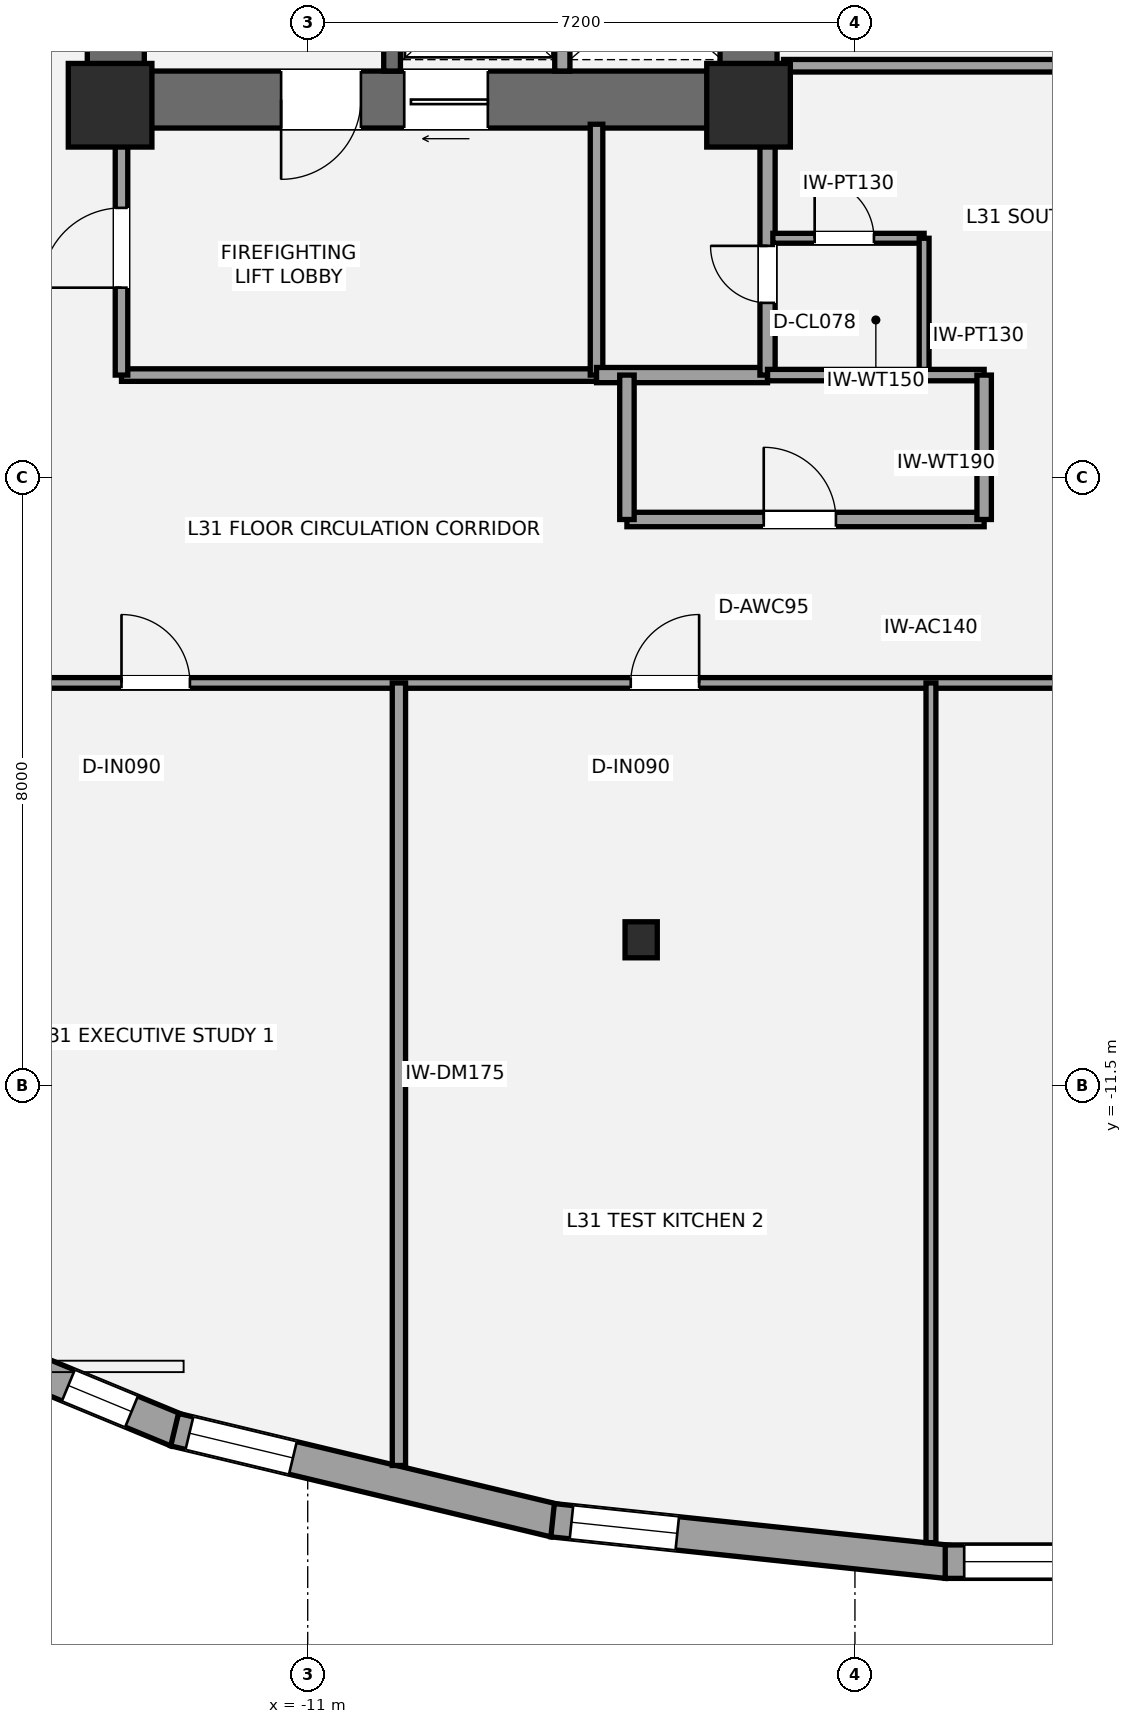
"""IFC4 building model, lengths in metres.
Left out: names, types, materials, properties, quantities, classifications, styles, units other than length and angle.
Written with IfcOpenShell. Run it as: python <this file> out.ifc"""

import sys

from ifc_helpers import new_model, si_unit, direction, frame, frame_2d, origin, origin_2d, place, context, subcontext, project, spatial, rectangle, i_section, extrude, element, fill, save


model = new_model("IFC4")
c1 = context("Model", 3, precision=1e-05, world=origin(), true_north=direction((0.0, 1.0)))
c2 = subcontext(c1, "Body", "Model", "MODEL_VIEW")
j1 = project(units=[si_unit("LENGTHUNIT", "METRE"), si_unit("PLANEANGLEUNIT", "RADIAN")], contexts=[c1])
p1 = place(None, origin())
s1 = spatial("IfcSite", under=j1, at=p1, CompositionType="ELEMENT")
p2 = place(p1, origin())
s2 = spatial("IfcBuilding", under=s1, at=p2, CompositionType="ELEMENT")
p3 = place(p2, frame((0.0, 0.0, 117.6)))
s3 = spatial("IfcBuildingStorey", under=s2, at=p3, CompositionType="ELEMENT", Elevation=117.6)
p4 = place(p3, frame((-13.525, 1.1, 0.0), z_axis=(0.0, 0.0, 1.0), x_axis=(0.0, 1.0, 0.0)))
e1 = element("IfcWall", 1, at=p4, inside=s3, PredefinedType="SHEAR", context=c2, shape_type="SweptSolid", body=[
    extrude(rectangle(XDim=8.65, YDim=0.75, at=frame_2d((4.325, 0.0))), origin(), (0.0, 0.0, 1.0), 3.5),
])
p5 = place(p3, frame((-4.825, 1.475, 0.0), z_axis=(0.0, 0.0, 1.0), x_axis=(-1.0, 0.0, 0.0)))
e2 = element("IfcWall", 2, at=p5, inside=s3, PredefinedType="SHEAR", context=c2, shape_type="SweptSolid", body=[
    extrude(rectangle(XDim=9.075, YDim=0.75, at=frame_2d((4.538, 0.0))), origin(), (0.0, 0.0, 1.0), 3.5),
])
p6 = place(p5, frame((5.475, 0.0, 0.0)))
e3 = element("IfcOpeningElement", 3, at=p6, cuts=e2, PredefinedType="OPENING", context=c2, shape_type="SweptSolid", body=[
    extrude(rectangle(XDim=1.05, YDim=2.15, at=frame_2d((0.525, 1.075))), frame((0.0, 0.385, 0.0), z_axis=(0.0, -1.0, 0.0), x_axis=(1.0, 0.0, 0.0)), (0.0, 0.0, 1.0), 0.77),
])
p7 = place(p5, frame((3.805, 0.0, 0.0)))
e4 = element("IfcOpeningElement", 4, at=p7, cuts=e2, PredefinedType="OPENING", context=c2, shape_type="SweptSolid", body=[
    extrude(rectangle(XDim=1.1, YDim=2.2, at=frame_2d((0.55, 1.1))), frame((0.0, 0.385, 0.0), z_axis=(0.0, -1.0, 0.0), x_axis=(1.0, 0.0, 0.0)), (0.0, 0.0, 1.0), 0.77),
])
p8 = place(p3, frame((-5.2, 1.1, 0.0), z_axis=(0.0, 0.0, 1.0), x_axis=(0.0, 1.0, 0.0)))
e5 = element("IfcWall", 5, at=p8, inside=s3, PredefinedType="SHEAR", context=c2, shape_type="SweptSolid", body=[
    extrude(rectangle(XDim=2.7, YDim=0.75, at=frame_2d((1.35, 0.0))), origin(), (0.0, 0.0, 1.0), 3.5),
])
p9 = place(p3, frame((-9.89, 1.85, 0.0), z_axis=(0.0, 0.0, 1.0), x_axis=(0.0, 1.0, 0.0)))
e6 = element("IfcWall", 6, at=p9, inside=s3, PredefinedType="SHEAR", context=c2, shape_type="SweptSolid", body=[
    extrude(rectangle(XDim=7.15, YDim=0.22, at=frame_2d((3.575, 0.0))), origin(), (0.0, 0.0, 1.0), 3.5),
])
for number, where, z_axis, x_axis in (
    (7, (-13.6, 1.4, 0.0), (0.0, 0.0, 1.0), (1.0, 0.0, 0.0)),
    (8, (-5.2, 1.4, 0.0), (0.0, 0.0, 1.0), (1.0, 0.0, 0.0)),
):
    element("IfcColumn", number, at=place(p3, frame(where, z_axis=z_axis, x_axis=x_axis)), inside=s3, PredefinedType="COLUMN", context=c2, shape_type="SweptSolid", body=[
        extrude(rectangle(XDim=1.1, YDim=1.1, at=origin_2d()), origin(), (0.0, 0.0, 1.0), 3.5),
    ])
p10 = place(p3, frame((-6.613, -9.579, 0.0), z_axis=(0.0, 0.0, 1.0), x_axis=(1.0, 0.0, 0.0)))
e9 = element("IfcColumn", 9, at=p10, inside=s3, PredefinedType="COLUMN", context=c2, shape_type="SweptSolid", body=[
    extrude(i_section(OverallWidth=0.424, OverallDepth=0.474, WebThickness=0.048, FlangeThickness=0.077, at=origin_2d()), origin(), (0.0, 0.0, 1.0), 3.5),
])
p11 = place(p3, frame((-12.718, -16.034, 0.0), z_axis=(0.0, 0.0, 1.0), x_axis=(-0.924140141084, 0.382053660678, 0.0)))
e10 = element("IfcWall", 10, at=p11, inside=s3, PredefinedType="STANDARD", context=c2, shape_type="SweptSolid", body=[
    extrude(rectangle(XDim=4.943, YDim=0.44, at=frame_2d((2.471, 0.0))), origin(), (0.0, 0.0, 1.0), 2.528),
])
p12 = place(p11, frame((0.649, 0.0, 0.58)))
e11 = element("IfcOpeningElement", 11, at=p12, cuts=e10, PredefinedType="OPENING", context=c2, shape_type="SweptSolid", body=[
    extrude(rectangle(XDim=0.9, YDim=1.35, at=frame_2d((0.45, 0.675))), frame((0.0, 0.23, 0.0), z_axis=(0.0, -1.0, 0.0), x_axis=(1.0, 0.0, 0.0)), (0.0, 0.0, 1.0), 0.46),
])
p13 = place(p3, frame((-7.75, -17.22, 0.0), z_axis=(0.0, 0.0, 1.0), x_axis=(-0.972539655933, 0.232737228734, 0.0)))
e12 = element("IfcWall", 12, at=p13, inside=s3, PredefinedType="STANDARD", context=c2, shape_type="SweptSolid", body=[
    extrude(rectangle(XDim=5.142, YDim=0.44, at=frame_2d((2.571, 0.0))), origin(), (0.0, 0.0, 1.0), 2.528),
])
p14 = place(p13, frame((3.542, 0.0, 0.58)))
e13 = element("IfcOpeningElement", 13, at=p14, cuts=e12, PredefinedType="OPENING", context=c2, shape_type="SweptSolid", body=[
    extrude(rectangle(XDim=1.4, YDim=1.55, at=frame_2d((0.7, 0.775))), frame((0.0, 0.23, 0.0), z_axis=(0.0, -1.0, 0.0), x_axis=(1.0, 0.0, 0.0)), (0.0, 0.0, 1.0), 0.46),
])
p15 = place(p3, frame((-2.589, -17.762, 0.0), z_axis=(0.0, 0.0, 1.0), x_axis=(-0.994501349718, 0.104723757619, 0.0)))
e14 = element("IfcWall", 14, at=p15, inside=s3, PredefinedType="STANDARD", context=c2, shape_type="SweptSolid", body=[
    extrude(rectangle(XDim=5.218, YDim=0.44, at=frame_2d((2.609, 0.0))), origin(), (0.0, 0.0, 1.0), 2.528),
])
p16 = place(p15, frame((3.568, 0.0, 0.85)))
e15 = element("IfcOpeningElement", 15, at=p16, cuts=e14, PredefinedType="OPENING", context=c2, shape_type="SweptSolid", body=[
    extrude(rectangle(XDim=1.4, YDim=1.55, at=frame_2d((0.7, 0.775))), frame((0.0, 0.23, 0.0), z_axis=(0.0, -1.0, 0.0), x_axis=(1.0, 0.0, 0.0)), (0.0, 0.0, 1.0), 0.46),
])
p17 = place(p3, frame((2.612, -17.761, 0.0), z_axis=(0.0, 0.0, 1.0), x_axis=(-1.0, 0.0, 0.0)))
e16 = element("IfcWall", 16, at=p17, inside=s3, PredefinedType="STANDARD", context=c2, shape_type="SweptSolid", body=[
    extrude(rectangle(XDim=5.225, YDim=0.44, at=frame_2d((2.612, 0.0))), origin(), (0.0, 0.0, 1.0), 2.528),
])
p18 = place(p17, frame((3.575, 0.0, 0.58)))
e17 = element("IfcOpeningElement", 17, at=p18, cuts=e16, PredefinedType="OPENING", context=c2, shape_type="SweptSolid", body=[
    extrude(rectangle(XDim=1.4, YDim=1.55, at=frame_2d((0.7, 0.775))), frame((0.0, 0.23, 0.0), z_axis=(0.0, -1.0, 0.0), x_axis=(1.0, 0.0, 0.0)), (0.0, 0.0, 1.0), 0.46),
])
p19 = place(p3, frame((-13.45, -2.15, 0.0), z_axis=(0.0, 0.0, 1.0), x_axis=(1.0, 0.0, 0.0)))
e18 = element("IfcWall", 18, at=p19, inside=s3, PredefinedType="PARTITIONING", context=c2, shape_type="SweptSolid", body=[
    extrude(rectangle(XDim=6.25, YDim=0.165, at=frame_2d((3.125, 0.0))), origin(), (0.0, 0.0, 1.0), 3.31),
])
p20 = place(p3, frame((-13.45, -2.15, 0.0), z_axis=(0.0, 0.0, 1.0), x_axis=(0.0, 1.0, 0.0)))
e19 = element("IfcWall", 19, at=p20, inside=s3, PredefinedType="PARTITIONING", context=c2, shape_type="SweptSolid", body=[
    extrude(rectangle(XDim=3.3, YDim=0.165, at=frame_2d((1.65, 0.0))), origin(), (0.0, 0.0, 1.0), 2.763),
])
p21 = place(p20, frame((1.15, 0.0, 0.0)))
e20 = element("IfcOpeningElement", 20, at=p21, cuts=e19, PredefinedType="OPENING", context=c2, shape_type="SweptSolid", body=[
    extrude(rectangle(XDim=1.05, YDim=2.15, at=frame_2d((0.525, 1.075))), frame((0.0, 0.093, 0.0), z_axis=(0.0, -1.0, 0.0), x_axis=(1.0, 0.0, 0.0)), (0.0, 0.0, 1.0), 0.185),
])
p22 = place(p3, frame((-7.2, -2.15, 0.0), z_axis=(0.0, 0.0, 1.0), x_axis=(0.0, 1.0, 0.0)))
e21 = element("IfcWall", 21, at=p22, inside=s3, PredefinedType="PARTITIONING", context=c2, shape_type="SweptSolid", body=[
    extrude(rectangle(XDim=3.3, YDim=0.165, at=frame_2d((1.65, 0.0))), origin(), (0.0, 0.0, 1.0), 3.31),
])
p23 = place(p3, frame((-7.2, -2.15, 0.0), z_axis=(0.0, 0.0, 1.0), x_axis=(1.0, 0.0, 0.0)))
e22 = element("IfcWall", 22, at=p23, inside=s3, PredefinedType="SOLIDWALL", context=c2, shape_type="SweptSolid", body=[
    extrude(rectangle(XDim=2.25, YDim=0.2, at=frame_2d((1.125, 0.0))), origin(), (0.0, 0.0, 1.0), 2.763),
])
p24 = place(p3, frame((-4.95, -2.15, 0.0), z_axis=(0.0, 0.0, 1.0), x_axis=(0.0, 1.0, 0.0)))
e23 = element("IfcWall", 23, at=p24, inside=s3, PredefinedType="SOLIDWALL", context=c2, shape_type="SweptSolid", body=[
    extrude(rectangle(XDim=3.3, YDim=0.2, at=frame_2d((1.65, 0.0))), origin(), (0.0, 0.0, 1.0), 2.763),
])
p25 = place(p24, frame((0.95, 0.0, 0.0)))
e24 = element("IfcOpeningElement", 24, at=p25, cuts=e23, PredefinedType="OPENING", context=c2, shape_type="SweptSolid", body=[
    extrude(rectangle(XDim=0.75, YDim=2.1, at=frame_2d((0.375, 1.05))), frame((0.0, 0.11, 0.0), z_axis=(0.0, -1.0, 0.0), x_axis=(1.0, 0.0, 0.0)), (0.0, 0.0, 1.0), 0.22),
])
p26 = place(p3, frame((-4.88, -0.35, 0.0), z_axis=(0.0, 0.0, 1.0), x_axis=(1.0, 0.0, 0.0)))
e25 = element("IfcWall", 25, at=p26, inside=s3, PredefinedType="PARTITIONING", context=c2, shape_type="SweptSolid", body=[
    extrude(rectangle(XDim=1.99, YDim=0.13, at=frame_2d((0.995, 0.0))), origin(), (0.0, 0.0, 1.0), 3.31),
])
p27 = place(p26, frame((0.55, 0.0, 0.0)))
e26 = element("IfcOpeningElement", 26, at=p27, cuts=e25, PredefinedType="OPENING", context=c2, shape_type="SweptSolid", body=[
    extrude(rectangle(XDim=0.78, YDim=2.1, at=frame_2d((0.39, 1.05))), frame((0.0, 0.075, 0.0), z_axis=(0.0, -1.0, 0.0), x_axis=(1.0, 0.0, 0.0)), (0.0, 0.0, 1.0), 0.15),
])
p28 = place(p3, frame((-2.89, -2.15, 0.0), z_axis=(0.0, 0.0, 1.0), x_axis=(0.0, 1.0, 0.0)))
e27 = element("IfcWall", 27, at=p28, inside=s3, PredefinedType="PARTITIONING", context=c2, shape_type="SweptSolid", body=[
    extrude(rectangle(XDim=1.8, YDim=0.13, at=frame_2d((0.9, 0.0))), origin(), (0.0, 0.0, 1.0), 3.31),
])
p29 = place(p3, frame((-7.65, 1.85, 0.0), z_axis=(0.0, 0.0, 1.0), x_axis=(0.0, 1.0, 0.0)))
e28 = element("IfcWall", 28, at=p29, inside=s3, PredefinedType="SOLIDWALL", context=c2, shape_type="SweptSolid", body=[
    extrude(rectangle(XDim=1.93, YDim=0.2, at=frame_2d((0.965, 0.0))), origin(), (0.0, 0.0, 1.0), 3.31),
])
p30 = place(p3, frame((-4.74, 1.92, 0.0), z_axis=(0.0, 0.0, 1.0), x_axis=(1.0, 0.0, 0.0)))
e29 = element("IfcWall", 29, at=p30, inside=s3, PredefinedType="PARTITIONING", context=c2, shape_type="SweptSolid", body=[
    extrude(rectangle(XDim=3.89, YDim=0.165, at=frame_2d((1.945, 0.0))), origin(), (0.0, 0.0, 1.0), 2.3),
])
p31 = place(p3, frame((-6.8, -4.05, 0.0), z_axis=(0.0, 0.0, 1.0), x_axis=(1.0, 0.0, 0.0)))
e30 = element("IfcWall", 30, at=p31, inside=s3, PredefinedType="PLUMBINGWALL", context=c2, shape_type="SweptSolid", body=[
    extrude(rectangle(XDim=4.7, YDim=0.19, at=frame_2d((2.35, 0.0))), origin(), (0.0, 0.0, 1.0), 2.763),
])
p32 = place(p31, frame((1.8, 0.0, 0.0)))
e31 = element("IfcOpeningElement", 31, at=p32, cuts=e30, PredefinedType="OPENING", context=c2, shape_type="SweptSolid", body=[
    extrude(rectangle(XDim=0.95, YDim=2.15, at=frame_2d((0.475, 1.075))), frame((0.0, 0.105, 0.0), z_axis=(0.0, -1.0, 0.0), x_axis=(1.0, 0.0, 0.0)), (0.0, 0.0, 1.0), 0.21),
])
p33 = place(p3, frame((-4.95, -2.15, 0.0), z_axis=(0.0, 0.0, 1.0), x_axis=(1.0, 0.0, 0.0)))
e32 = element("IfcWall", 32, at=p33, inside=s3, PredefinedType="PLUMBINGWALL", context=c2, shape_type="SweptSolid", body=[
    extrude(rectangle(XDim=2.85, YDim=0.15, at=frame_2d((1.425, 0.0))), origin(), (0.0, 0.0, 1.0), 2.763),
])
for number, where, z_axis, x_axis in (
    (33, (-6.8, -4.05, 0.0), (0.0, 0.0, 1.0), (0.0, 1.0, 0.0)),
    (34, (-2.1, -4.05, 0.0), (0.0, 0.0, 1.0), (0.0, 1.0, 0.0)),
):
    element("IfcWall", number, at=place(p3, frame(where, z_axis=z_axis, x_axis=x_axis)), inside=s3, PredefinedType="PLUMBINGWALL", context=c2, shape_type="SweptSolid", body=[
        extrude(rectangle(XDim=1.9, YDim=0.19, at=frame_2d((0.95, 0.0))), origin(), (0.0, 0.0, 1.0), 3.31),
    ])
p34 = place(p3, frame((-16.2, -6.2, 0.0), z_axis=(0.0, 0.0, 1.0), x_axis=(1.0, 0.0, 0.0)))
e35 = element("IfcWall", 35, at=p34, inside=s3, PredefinedType="PARTITIONING", context=c2, shape_type="SweptSolid", body=[
    extrude(rectangle(XDim=34.0, YDim=0.14, at=frame_2d((17.0, 0.0))), origin(), (0.0, 0.0, 1.0), 2.688),
])
p35 = place(p34, frame((2.75, 0.0, 0.0)))
e36 = element("IfcOpeningElement", 36, at=p35, cuts=e35, PredefinedType="OPENING", context=c2, shape_type="SweptSolid", body=[
    extrude(rectangle(XDim=0.9, YDim=2.1, at=frame_2d((0.45, 1.05))), frame((0.0, 0.08, 0.0), z_axis=(0.0, -1.0, 0.0), x_axis=(1.0, 0.0, 0.0)), (0.0, 0.0, 1.0), 0.16),
])
p36 = place(p34, frame((9.45, 0.0, 0.0)))
e37 = element("IfcOpeningElement", 37, at=p36, cuts=e35, PredefinedType="OPENING", context=c2, shape_type="SweptSolid", body=[
    extrude(rectangle(XDim=0.9, YDim=2.1, at=frame_2d((0.45, 1.05))), frame((0.0, 0.08, 0.0), z_axis=(0.0, -1.0, 0.0), x_axis=(1.0, 0.0, 0.0)), (0.0, 0.0, 1.0), 0.16),
])
p37 = place(p34, frame((16.45, 0.0, 0.0)))
e38 = element("IfcOpeningElement", 38, at=p37, cuts=e35, PredefinedType="OPENING", context=c2, shape_type="SweptSolid", body=[
    extrude(rectangle(XDim=0.9, YDim=2.1, at=frame_2d((0.45, 1.05))), frame((0.0, 0.08, 0.0), z_axis=(0.0, -1.0, 0.0), x_axis=(1.0, 0.0, 0.0)), (0.0, 0.0, 1.0), 0.16),
])
p38 = place(p34, frame((22.95, 0.0, 0.0)))
e39 = element("IfcOpeningElement", 39, at=p38, cuts=e35, PredefinedType="OPENING", context=c2, shape_type="SweptSolid", body=[
    extrude(rectangle(XDim=0.9, YDim=2.1, at=frame_2d((0.45, 1.05))), frame((0.0, 0.08, 0.0), z_axis=(0.0, -1.0, 0.0), x_axis=(1.0, 0.0, 0.0)), (0.0, 0.0, 1.0), 0.16),
])
p39 = place(p34, frame((29.45, 0.0, 0.0)))
e40 = element("IfcOpeningElement", 40, at=p39, cuts=e35, PredefinedType="OPENING", context=c2, shape_type="SweptSolid", body=[
    extrude(rectangle(XDim=1.5, YDim=2.15, at=frame_2d((0.75, 1.075))), frame((0.0, 0.08, 0.0), z_axis=(0.0, -1.0, 0.0), x_axis=(1.0, 0.0, 0.0)), (0.0, 0.0, 1.0), 0.16),
])
p40 = place(p3, frame((-9.8, -16.495, 0.0), z_axis=(0.0, 0.0, 1.0), x_axis=(0.0, 1.0, 0.0)))
e41 = element("IfcWall", 41, at=p40, inside=s3, PredefinedType="PARTITIONING", context=c2, shape_type="SweptSolid", body=[
    extrude(rectangle(XDim=10.295, YDim=0.175, at=frame_2d((5.148, 0.0))), origin(), (0.0, 0.0, 1.0), 3.31),
])
p41 = place(p3, frame((-2.8, -17.51, 0.0), z_axis=(0.0, 0.0, 1.0), x_axis=(0.0, 1.0, 0.0)))
e42 = element("IfcWall", 42, at=p41, inside=s3, PredefinedType="PARTITIONING", context=c2, shape_type="SweptSolid", body=[
    extrude(rectangle(XDim=11.311, YDim=0.13, at=frame_2d((5.655, 0.0))), origin(), (0.0, 0.0, 1.0), 2.763),
])
p42 = place(p12, origin())
e43 = element("IfcWindow", 43, at=p42, inside=s3, PartitioningType="SINGLE_PANEL", PredefinedType="WINDOW", context=c2, shape_type="SweptSolid", body=[
    extrude(rectangle(XDim=0.9, YDim=1.35, at=frame_2d((0.45, 0.675))), frame((0.0, -0.01, 0.0), z_axis=(0.0, -1.0, 0.0), x_axis=(1.0, 0.0, 0.0)), (0.0, 0.0, 1.0), 0.06),
])
fill(e11, e43)
p43 = place(p14, origin())
e44 = element("IfcWindow", 44, at=p43, inside=s3, PartitioningType="SINGLE_PANEL", PredefinedType="WINDOW", context=c2, shape_type="SweptSolid", body=[
    extrude(rectangle(XDim=1.4, YDim=1.55, at=frame_2d((0.7, 0.775))), frame((0.0, -0.01, 0.0), z_axis=(0.0, -1.0, 0.0), x_axis=(1.0, 0.0, 0.0)), (0.0, 0.0, 1.0), 0.06),
])
fill(e13, e44)
p44 = place(p16, origin())
e45 = element("IfcWindow", 45, at=p44, inside=s3, PartitioningType="SINGLE_PANEL", PredefinedType="WINDOW", context=c2, shape_type="SweptSolid", body=[
    extrude(rectangle(XDim=1.4, YDim=1.55, at=frame_2d((0.7, 0.775))), frame((0.0, -0.01, 0.0), z_axis=(0.0, -1.0, 0.0), x_axis=(1.0, 0.0, 0.0)), (0.0, 0.0, 1.0), 0.06),
])
fill(e15, e45)
p45 = place(p18, origin())
e46 = element("IfcWindow", 46, at=p45, inside=s3, PartitioningType="SINGLE_PANEL", PredefinedType="WINDOW", context=c2, shape_type="SweptSolid", body=[
    extrude(rectangle(XDim=1.4, YDim=1.55, at=frame_2d((0.7, 0.775))), frame((0.0, -0.01, 0.0), z_axis=(0.0, -1.0, 0.0), x_axis=(1.0, 0.0, 0.0)), (0.0, 0.0, 1.0), 0.06),
])
fill(e17, e46)
p46 = place(p6, origin())
e47 = element("IfcDoor", 47, at=p46, inside=s3, OperationType="SINGLE_SWING_RIGHT", PredefinedType="DOOR", context=c2, shape_type="SweptSolid", body=[
    extrude(rectangle(XDim=1.05, YDim=2.15, at=frame_2d((0.525, 1.075))), frame((0.0, 0.025, 0.0), z_axis=(0.0, -1.0, 0.0), x_axis=(1.0, 0.0, 0.0)), (0.0, 0.0, 1.0), 0.05),
])
fill(e3, e47)
p47 = place(p21, origin())
e48 = element("IfcDoor", 48, at=p47, inside=s3, OperationType="SINGLE_SWING_LEFT", PredefinedType="DOOR", context=c2, shape_type="SweptSolid", body=[
    extrude(rectangle(XDim=1.05, YDim=2.15, at=frame_2d((0.525, 1.075))), frame((0.0, 0.025, 0.0), z_axis=(0.0, -1.0, 0.0), x_axis=(1.0, 0.0, 0.0)), (0.0, 0.0, 1.0), 0.05),
])
fill(e20, e48)
p48 = place(p25, origin())
e49 = element("IfcDoor", 49, at=p48, inside=s3, OperationType="SINGLE_SWING_RIGHT", PredefinedType="DOOR", context=c2, shape_type="SweptSolid", body=[
    extrude(rectangle(XDim=0.75, YDim=2.1, at=frame_2d((0.375, 1.05))), frame((0.0, 0.025, 0.0), z_axis=(0.0, -1.0, 0.0), x_axis=(1.0, 0.0, 0.0)), (0.0, 0.0, 1.0), 0.05),
])
fill(e24, e49)
p49 = place(p27, origin())
e50 = element("IfcDoor", 50, at=p49, inside=s3, OperationType="SINGLE_SWING_LEFT", PredefinedType="DOOR", context=c2, shape_type="SweptSolid", body=[
    extrude(rectangle(XDim=0.78, YDim=2.1, at=frame_2d((0.39, 1.05))), frame((0.0, 0.025, 0.0), z_axis=(0.0, -1.0, 0.0), x_axis=(1.0, 0.0, 0.0)), (0.0, 0.0, 1.0), 0.05),
])
fill(e26, e50)
p50 = place(p7, origin())
e51 = element("IfcDoor", 51, at=p50, inside=s3, OperationType="SLIDING_TO_LEFT", PredefinedType="DOOR", context=c2, shape_type="SweptSolid", body=[
    extrude(rectangle(XDim=1.1, YDim=2.2, at=frame_2d((0.55, 1.1))), frame((0.0, 0.025, 0.0), z_axis=(0.0, -1.0, 0.0), x_axis=(1.0, 0.0, 0.0)), (0.0, 0.0, 1.0), 0.05),
])
fill(e4, e51)
p51 = place(p32, origin())
e52 = element("IfcDoor", 52, at=p51, inside=s3, OperationType="SINGLE_SWING_LEFT", PredefinedType="DOOR", context=c2, shape_type="SweptSolid", body=[
    extrude(rectangle(XDim=0.95, YDim=2.15, at=frame_2d((0.475, 1.075))), frame((0.0, 0.025, 0.0), z_axis=(0.0, -1.0, 0.0), x_axis=(1.0, 0.0, 0.0)), (0.0, 0.0, 1.0), 0.05),
])
fill(e31, e52)
p52 = place(p35, origin())
e53 = element("IfcDoor", 53, at=p52, inside=s3, OperationType="SINGLE_SWING_LEFT", PredefinedType="DOOR", context=c2, shape_type="SweptSolid", body=[
    extrude(rectangle(XDim=0.9, YDim=2.1, at=frame_2d((0.45, 1.05))), frame((0.0, 0.025, 0.0), z_axis=(0.0, -1.0, 0.0), x_axis=(1.0, 0.0, 0.0)), (0.0, 0.0, 1.0), 0.05),
])
fill(e36, e53)
p53 = place(p36, origin())
e54 = element("IfcDoor", 54, at=p53, inside=s3, OperationType="SINGLE_SWING_RIGHT", PredefinedType="DOOR", context=c2, shape_type="SweptSolid", body=[
    extrude(rectangle(XDim=0.9, YDim=2.1, at=frame_2d((0.45, 1.05))), frame((0.0, 0.025, 0.0), z_axis=(0.0, -1.0, 0.0), x_axis=(1.0, 0.0, 0.0)), (0.0, 0.0, 1.0), 0.05),
])
fill(e37, e54)
save(model, sys.argv[1])
